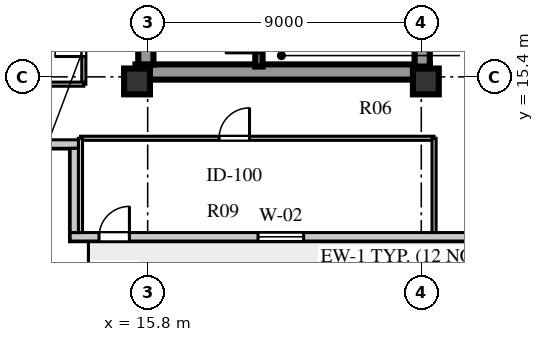
"""IFC4 building model, lengths in metres.
Left out: names, types, materials, properties, quantities, classifications, styles, units other than length and angle.
Written with IfcOpenShell. Run it as: python <this file> out.ifc"""

import sys

from ifc_helpers import new_model, si_unit, direction, frame, frame_2d, origin, origin_2d, place, context, subcontext, project, spatial, rectangle, extrude, element, fill, save


model = new_model("IFC4")
c1 = context("Model", 3, precision=1e-05, world=origin(), true_north=direction((0.0, 1.0)))
c2 = subcontext(c1, "Body", "Model", "MODEL_VIEW")
j1 = project(units=[si_unit("LENGTHUNIT", "METRE"), si_unit("PLANEANGLEUNIT", "RADIAN")], contexts=[c1])
p1 = place(None, origin())
s1 = spatial("IfcSite", under=j1, at=p1, CompositionType="ELEMENT")
p2 = place(p1, origin())
s2 = spatial("IfcBuilding", under=s1, at=p2, CompositionType="ELEMENT")
p3 = place(p2, frame((0.0, 0.0, 119.4)))
s3 = spatial("IfcBuildingStorey", under=s2, at=p3, CompositionType="ELEMENT", Elevation=119.4)
p4 = place(p3, frame((15.4, 15.56, 0.0), z_axis=(0.0, 0.0, 1.0), x_axis=(1.0, 0.0, 0.0)))
e1 = element("IfcWall", 1, at=p4, inside=s3, PredefinedType="SHEAR", context=c2, shape_type="SweptSolid", body=[
    extrude(rectangle(XDim=9.68, YDim=0.5, at=frame_2d((4.84, 0.0))), origin(), (0.0, 0.0, 1.0), 3.6),
])
p5 = place(p3, frame((15.74, 15.81, 0.0), z_axis=(0.0, 0.0, 1.0), x_axis=(0.0, 1.0, 0.0)))
e2 = element("IfcWall", 2, at=p5, inside=s3, PredefinedType="SHEAR", context=c2, shape_type="SweptSolid", body=[
    extrude(rectangle(XDim=25.63, YDim=0.5, at=frame_2d((12.815, 0.0))), origin(), (0.0, 0.0, 1.0), 3.6),
])
p6 = place(p3, frame((24.83, 15.74, 0.0), z_axis=(0.0, 0.0, 1.0), x_axis=(0.0, 1.0, 0.0)))
e3 = element("IfcWall", 3, at=p6, inside=s3, PredefinedType="SHEAR", context=c2, shape_type="SweptSolid", body=[
    extrude(rectangle(XDim=25.76, YDim=0.5, at=frame_2d((12.88, 0.0))), origin(), (0.0, 0.0, 1.0), 3.6),
])
p7 = place(p6, frame((1.61, 0.0, 0.0)))
e4 = element("IfcOpeningElement", 4, at=p7, cuts=e3, PredefinedType="OPENING", context=c2, shape_type="SweptSolid", body=[
    extrude(rectangle(XDim=1.2, YDim=2.1, at=frame_2d((0.6, 1.05))), frame((0.0, 0.26, 0.0), z_axis=(0.0, -1.0, 0.0), x_axis=(1.0, 0.0, 0.0)), (0.0, 0.0, 1.0), 0.52),
])
p8 = place(p6, frame((6.78, 0.0, 0.0)))
e5 = element("IfcOpeningElement", 5, at=p8, cuts=e3, PredefinedType="OPENING", context=c2, shape_type="SweptSolid", body=[
    extrude(rectangle(XDim=0.85, YDim=2.06, at=frame_2d((0.425, 1.03))), frame((0.0, 0.26, 0.0), z_axis=(0.0, -1.0, 0.0), x_axis=(1.0, 0.0, 0.0)), (0.0, 0.0, 1.0), 0.52),
])
p9 = place(p6, frame((12.11, 0.0, 0.0)))
e6 = element("IfcOpeningElement", 6, at=p9, cuts=e3, PredefinedType="OPENING", context=c2, shape_type="SweptSolid", body=[
    extrude(rectangle(XDim=1.5, YDim=2.12, at=frame_2d((0.75, 1.06))), frame((0.0, 0.26, 0.0), z_axis=(0.0, -1.0, 0.0), x_axis=(1.0, 0.0, 0.0)), (0.0, 0.0, 1.0), 0.52),
])
p10 = place(p6, frame((20.11, 0.0, 0.0)))
e7 = element("IfcOpeningElement", 7, at=p10, cuts=e3, PredefinedType="OPENING", context=c2, shape_type="SweptSolid", body=[
    extrude(rectangle(XDim=1.2, YDim=2.12, at=frame_2d((0.6, 1.06))), frame((0.0, 0.26, 0.0), z_axis=(0.0, -1.0, 0.0), x_axis=(1.0, 0.0, 0.0)), (0.0, 0.0, 1.0), 0.52),
])
p11 = place(p6, frame((24.01, 0.0, 0.0)))
e8 = element("IfcOpeningElement", 8, at=p11, cuts=e3, PredefinedType="OPENING", context=c2, shape_type="SweptSolid", body=[
    extrude(rectangle(XDim=0.95, YDim=2.1, at=frame_2d((0.475, 1.05))), frame((0.0, 0.26, 0.0), z_axis=(0.0, -1.0, 0.0), x_axis=(1.0, 0.0, 0.0)), (0.0, 0.0, 1.0), 0.52),
])
for number, where, z_axis, x_axis in (
    (9, (15.45, 15.25, 0.0), (0.0, 0.0, 1.0), (1.0, 0.0, 0.0)),
    (10, (24.95, 15.25, 0.0), (0.0, 0.0, 1.0), (1.0, 0.0, 0.0)),
):
    element("IfcColumn", number, at=place(p3, frame(where, z_axis=z_axis, x_axis=x_axis)), inside=s3, PredefinedType="COLUMN", context=c2, shape_type="SweptSolid", body=[
        extrude(rectangle(XDim=0.85, YDim=0.85, at=origin_2d()), origin(), (0.0, 0.0, 1.0), 3.6),
    ])
p12 = place(p3, frame((13.25, 10.14, 0.0), z_axis=(0.0, 0.0, 1.0), x_axis=(1.0, 0.0, 0.0)))
e11 = element("IfcWall", 11, at=p12, inside=s3, PredefinedType="STANDARD", context=c2, shape_type="SweptSolid", body=[
    extrude(rectangle(XDim=32.1, YDim=0.28, at=frame_2d((16.05, 0.0))), origin(), (0.0, 0.0, 1.0), 3.6),
])
p13 = place(p12, frame((0.95, 0.0, 0.0)))
e12 = element("IfcOpeningElement", 12, at=p13, cuts=e11, PredefinedType="OPENING", context=c2, shape_type="SweptSolid", body=[
    extrude(rectangle(XDim=1.0, YDim=2.05, at=frame_2d((0.5, 1.025))), frame((0.0, 0.15, 0.0), z_axis=(0.0, -1.0, 0.0), x_axis=(1.0, 0.0, 0.0)), (0.0, 0.0, 1.0), 0.3),
])
p14 = place(p12, frame((6.18, 0.0, 0.8)))
e13 = element("IfcOpeningElement", 13, at=p14, cuts=e11, PredefinedType="OPENING", context=c2, shape_type="SweptSolid", body=[
    extrude(rectangle(XDim=1.5, YDim=2.0, at=frame_2d((0.75, 1.0))), frame((0.0, 0.15, 0.0), z_axis=(0.0, -1.0, 0.0), x_axis=(1.0, 0.0, 0.0)), (0.0, 0.0, 1.0), 0.3),
])
p15 = place(p12, frame((14.195, 0.0, 0.8)))
e14 = element("IfcOpeningElement", 14, at=p15, cuts=e11, PredefinedType="OPENING", context=c2, shape_type="SweptSolid", body=[
    extrude(rectangle(XDim=1.2, YDim=1.75, at=frame_2d((0.6, 0.875))), frame((0.0, 0.15, 0.0), z_axis=(0.0, -1.0, 0.0), x_axis=(1.0, 0.0, 0.0)), (0.0, 0.0, 1.0), 0.3),
])
p16 = place(p12, frame((18.085, 0.0, 0.8)))
e15 = element("IfcOpeningElement", 15, at=p16, cuts=e11, PredefinedType="OPENING", context=c2, shape_type="SweptSolid", body=[
    extrude(rectangle(XDim=1.2, YDim=1.75, at=frame_2d((0.6, 0.875))), frame((0.0, 0.15, 0.0), z_axis=(0.0, -1.0, 0.0), x_axis=(1.0, 0.0, 0.0)), (0.0, 0.0, 1.0), 0.3),
])
p17 = place(p12, frame((21.505, 0.0, 0.8)))
e16 = element("IfcOpeningElement", 16, at=p17, cuts=e11, PredefinedType="OPENING", context=c2, shape_type="SweptSolid", body=[
    extrude(rectangle(XDim=2.1, YDim=1.95, at=frame_2d((1.05, 0.975))), frame((0.0, 0.15, 0.0), z_axis=(0.0, -1.0, 0.0), x_axis=(1.0, 0.0, 0.0)), (0.0, 0.0, 1.0), 0.3),
])
p18 = place(p12, frame((25.865, 0.0, 0.8)))
e17 = element("IfcOpeningElement", 17, at=p18, cuts=e11, PredefinedType="OPENING", context=c2, shape_type="SweptSolid", body=[
    extrude(rectangle(XDim=1.2, YDim=1.75, at=frame_2d((0.6, 0.875))), frame((0.0, 0.15, 0.0), z_axis=(0.0, -1.0, 0.0), x_axis=(1.0, 0.0, 0.0)), (0.0, 0.0, 1.0), 0.3),
])
p19 = place(p12, frame((28.955, 0.0, 0.8)))
e18 = element("IfcOpeningElement", 18, at=p19, cuts=e11, PredefinedType="OPENING", context=c2, shape_type="SweptSolid", body=[
    extrude(rectangle(XDim=1.65, YDim=1.95, at=frame_2d((0.825, 0.975))), frame((0.0, 0.15, 0.0), z_axis=(0.0, -1.0, 0.0), x_axis=(1.0, 0.0, 0.0)), (0.0, 0.0, 1.0), 0.3),
])
p20 = place(p3, frame((10.2, 13.19, 0.0), z_axis=(0.0, 0.0, 1.0), x_axis=(1.0, 0.0, 0.0)))
e19 = element("IfcWall", 19, at=p20, inside=s3, PredefinedType="STANDARD", context=c2, shape_type="SweptSolid", body=[
    extrude(rectangle(XDim=3.33, YDim=0.28, at=frame_2d((1.665, 0.0))), origin(), (0.0, 0.0, 1.0), 3.6),
])
p21 = place(p3, frame((13.39, 13.05, 0.0), z_axis=(0.0, 0.0, 1.0), x_axis=(0.0, -1.0, 0.0)))
e20 = element("IfcWall", 20, at=p21, inside=s3, PredefinedType="STANDARD", context=c2, shape_type="SweptSolid", body=[
    extrude(rectangle(XDim=2.77, YDim=0.28, at=frame_2d((1.385, 0.0))), origin(), (0.0, 0.0, 1.0), 3.6),
])
p22 = place(p3, frame((19.46, 15.74, 0.0), z_axis=(0.0, 0.0, 1.0), x_axis=(0.0, 1.0, 0.0)))
e21 = element("IfcWall", 21, at=p22, inside=s3, PredefinedType="SHEAR", context=c2, shape_type="SweptSolid", body=[
    extrude(rectangle(XDim=8.2, YDim=0.24, at=frame_2d((4.1, 0.0))), origin(), (0.0, 0.0, 1.0), 3.85),
])
p23 = place(p22, frame((0.45, 0.0, 0.0)))
e22 = element("IfcOpeningElement", 22, at=p23, cuts=e21, PredefinedType="OPENING", context=c2, shape_type="SweptSolid", body=[
    extrude(rectangle(XDim=1.1, YDim=2.1, at=frame_2d((0.55, 1.05))), frame((0.0, 0.13, 0.0), z_axis=(0.0, -1.0, 0.0), x_axis=(1.0, 0.0, 0.0)), (0.0, 0.0, 1.0), 0.26),
])
p24 = place(p3, frame((13.7, 15.16, 0.0), z_axis=(0.0, 0.0, 1.0), x_axis=(0.0, 1.0, 0.0)))
e23 = element("IfcWall", 23, at=p24, inside=s3, PredefinedType="PARTITIONING", context=c2, shape_type="SweptSolid", body=[
    extrude(rectangle(XDim=26.88, YDim=0.135, at=frame_2d((13.44, 0.0))), origin(), (0.0, 0.0, 1.0), 3.6),
])
p25 = place(p24, frame((0.91, 0.0, 0.0)))
e24 = element("IfcOpeningElement", 24, at=p25, cuts=e23, PredefinedType="OPENING", context=c2, shape_type="SweptSolid", body=[
    extrude(rectangle(XDim=0.95, YDim=2.1, at=frame_2d((0.475, 1.05))), frame((0.0, 0.078, 0.0), z_axis=(0.0, -1.0, 0.0), x_axis=(1.0, 0.0, 0.0)), (0.0, 0.0, 1.0), 0.155),
])
p26 = place(p24, frame((13.99, 0.0, 0.0)))
e25 = element("IfcOpeningElement", 25, at=p26, cuts=e23, PredefinedType="OPENING", context=c2, shape_type="SweptSolid", body=[
    extrude(rectangle(XDim=0.95, YDim=2.1, at=frame_2d((0.475, 1.05))), frame((0.0, 0.078, 0.0), z_axis=(0.0, -1.0, 0.0), x_axis=(1.0, 0.0, 0.0)), (0.0, 0.0, 1.0), 0.155),
])
p27 = place(p3, frame((10.48, 15.16, 0.0), z_axis=(0.0, 0.0, 1.0), x_axis=(1.0, 0.0, 0.0)))
e26 = element("IfcWall", 26, at=p27, inside=s3, PredefinedType="PARTITIONING", context=c2, shape_type="SweptSolid", body=[
    extrude(rectangle(XDim=3.22, YDim=0.135, at=frame_2d((1.61, 0.0))), origin(), (0.0, 0.0, 1.0), 3.1),
])
p28 = place(p3, frame((13.59, 13.38, 0.0), z_axis=(0.0, 0.0, 1.0), x_axis=(1.0, 0.0, 0.0)))
e27 = element("IfcWall", 27, at=p28, inside=s3, PredefinedType="PARTITIONING", context=c2, shape_type="SweptSolid", body=[
    extrude(rectangle(XDim=11.63, YDim=0.135, at=frame_2d((5.815, 0.0))), origin(), (0.0, 0.0, 1.0), 3.6),
])
p29 = place(p28, frame((4.56, 0.0, 0.0)))
e28 = element("IfcOpeningElement", 28, at=p29, cuts=e27, PredefinedType="OPENING", context=c2, shape_type="SweptSolid", body=[
    extrude(rectangle(XDim=1.0, YDim=2.08, at=frame_2d((0.5, 1.04))), frame((0.0, 0.078, 0.0), z_axis=(0.0, -1.0, 0.0), x_axis=(1.0, 0.0, 0.0)), (0.0, 0.0, 1.0), 0.155),
])
p30 = place(p3, frame((13.59, 10.28, 0.0), z_axis=(0.0, 0.0, 1.0), x_axis=(0.0, 1.0, 0.0)))
e29 = element("IfcWall", 29, at=p30, inside=s3, PredefinedType="PARTITIONING", context=c2, shape_type="SweptSolid", body=[
    extrude(rectangle(XDim=3.1, YDim=0.135, at=frame_2d((1.55, 0.0))), origin(), (0.0, 0.0, 1.0), 3.6),
])
p31 = place(p3, frame((25.22, 10.28, 0.0), z_axis=(0.0, 0.0, 1.0), x_axis=(0.0, 1.0, 0.0)))
e30 = element("IfcWall", 30, at=p31, inside=s3, PredefinedType="PARTITIONING", context=c2, shape_type="SweptSolid", body=[
    extrude(rectangle(XDim=3.1, YDim=0.135, at=frame_2d((1.55, 0.0))), origin(), (0.0, 0.0, 1.0), 3.1),
])
p32 = place(p13, frame((1.0, 0.0, 0.0), z_axis=(0.0, 0.0, 1.0), x_axis=(-1.0, 0.0, 0.0)))
e31 = element("IfcDoor", 31, at=p32, inside=s3, OperationType="SINGLE_SWING_LEFT", PredefinedType="DOOR", context=c2, shape_type="SweptSolid", body=[
    extrude(rectangle(XDim=1.0, YDim=2.05, at=frame_2d((0.5, 1.025))), frame((0.0, 0.025, 0.0), z_axis=(0.0, -1.0, 0.0), x_axis=(1.0, 0.0, 0.0)), (0.0, 0.0, 1.0), 0.05),
])
fill(e12, e31)
p33 = place(p14, origin())
e32 = element("IfcWindow", 32, at=p33, inside=s3, PartitioningType="SINGLE_PANEL", PredefinedType="WINDOW", context=c2, shape_type="SweptSolid", body=[
    extrude(rectangle(XDim=1.5, YDim=2.0, at=frame_2d((0.75, 1.0))), frame((0.0, 0.03, 0.0), z_axis=(0.0, -1.0, 0.0), x_axis=(1.0, 0.0, 0.0)), (0.0, 0.0, 1.0), 0.06),
])
fill(e13, e32)
p34 = place(p23, origin())
e33 = element("IfcDoor", 33, at=p34, inside=s3, OperationType="SINGLE_SWING_LEFT", PredefinedType="DOOR", context=c2, shape_type="SweptSolid", body=[
    extrude(rectangle(XDim=1.1, YDim=2.1, at=frame_2d((0.55, 1.05))), frame((0.0, 0.025, 0.0), z_axis=(0.0, -1.0, 0.0), x_axis=(1.0, 0.0, 0.0)), (0.0, 0.0, 1.0), 0.05),
])
fill(e22, e33)
p35 = place(p29, frame((1.0, 0.0, 0.0), z_axis=(0.0, 0.0, 1.0), x_axis=(-1.0, 0.0, 0.0)))
e34 = element("IfcDoor", 34, at=p35, inside=s3, OperationType="SINGLE_SWING_LEFT", PredefinedType="DOOR", context=c2, shape_type="SweptSolid", body=[
    extrude(rectangle(XDim=1.0, YDim=2.08, at=frame_2d((0.5, 1.04))), frame((0.0, 0.025, 0.0), z_axis=(0.0, -1.0, 0.0), x_axis=(1.0, 0.0, 0.0)), (0.0, 0.0, 1.0), 0.05),
])
fill(e28, e34)
p36 = place(p25, origin())
e35 = element("IfcDoor", 35, at=p36, inside=s3, OperationType="SINGLE_SWING_LEFT", PredefinedType="DOOR", context=c2, shape_type="SweptSolid", body=[
    extrude(rectangle(XDim=0.95, YDim=2.1, at=frame_2d((0.475, 1.05))), frame((0.0, 0.025, 0.0), z_axis=(0.0, -1.0, 0.0), x_axis=(1.0, 0.0, 0.0)), (0.0, 0.0, 1.0), 0.05),
])
fill(e24, e35)
save(model, sys.argv[1])
